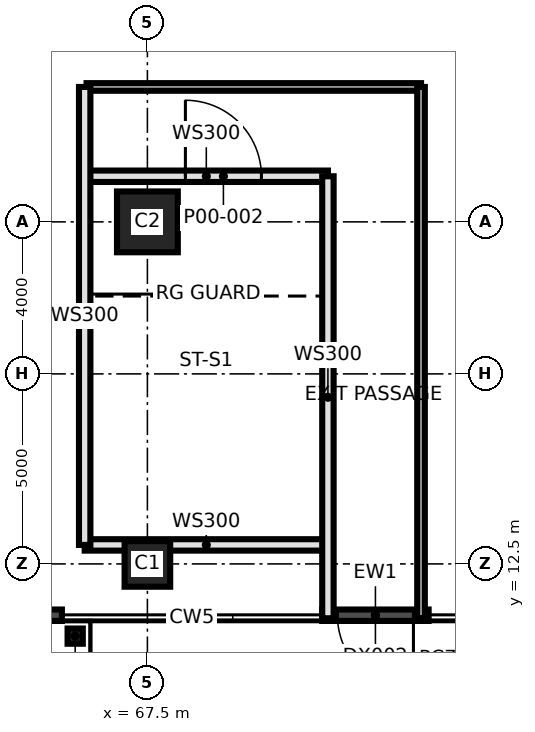
"""IFC4 building model, lengths in metres.
Left out: names, types, materials, properties, quantities, classifications, styles, units other than length and angle.
Written with IfcOpenShell. Run it as: python <this file> out.ifc"""

import sys

from ifc_helpers import new_model, si_unit, direction, frame, frame_2d, origin, origin_2d, place, context, subcontext, project, spatial, rectangle, extrude, element, fill, save


model = new_model("IFC4")
c1 = context("Model", 3, precision=1e-05, world=origin(), true_north=direction((0.0, 1.0)))
c2 = subcontext(c1, "Body", "Model", "MODEL_VIEW")
j1 = project(units=[si_unit("LENGTHUNIT", "METRE"), si_unit("PLANEANGLEUNIT", "RADIAN")], contexts=[c1])
p1 = place(None, origin())
s1 = spatial("IfcSite", under=j1, at=p1, CompositionType="ELEMENT")
p2 = place(p1, origin())
s2 = spatial("IfcBuilding", under=s1, at=p2, CompositionType="ELEMENT")
p3 = place(p2, origin())
s3 = spatial("IfcBuildingStorey", under=s2, at=p3, CompositionType="ELEMENT", Elevation=0.0)
p4 = place(p3, frame((67.5, 12.5, 0.0), z_axis=(0.0, 0.0, 1.0), x_axis=(1.0, 0.0, 0.0)))
e1 = element("IfcColumn", 1, at=p4, inside=s3, PredefinedType="COLUMN", context=c2, shape_type="SweptSolid", body=[
    extrude(rectangle(XDim=1.2, YDim=1.2, at=origin_2d()), origin(), (0.0, 0.0, 1.0), 8.0),
])
p5 = place(p3, frame((67.5, 21.5, 0.0), z_axis=(0.0, 0.0, 1.0), x_axis=(1.0, 0.0, 0.0)))
e2 = element("IfcColumn", 2, at=p5, inside=s3, PredefinedType="COLUMN", context=c2, shape_type="SweptSolid", body=[
    extrude(rectangle(XDim=1.6, YDim=1.6, at=origin_2d()), origin(), (0.0, 0.0, 1.0), 8.0),
])
p6 = place(p3, frame((65.25, 11.15, 0.0), z_axis=(0.0, 0.0, 1.0), x_axis=(-1.0, 0.0, 0.0)))
e3 = element("IfcWall", 3, at=p6, inside=s3, PredefinedType="SOLIDWALL", context=c2, shape_type="SweptSolid", body=[
    extrude(rectangle(XDim=4.5, YDim=0.3, at=frame_2d((2.25, 0.0))), origin(), (0.0, 0.0, 1.0), 7.7),
])
p7 = place(p6, frame((0.45, 0.0, 0.0)))
e4 = element("IfcOpeningElement", 4, at=p7, cuts=e3, PredefinedType="OPENING", context=c2, shape_type="SweptSolid", body=[
    extrude(rectangle(XDim=3.6, YDim=3.0, at=frame_2d((1.8, 1.5))), frame((0.0, 0.16, 0.0), z_axis=(0.0, -1.0, 0.0), x_axis=(1.0, 0.0, 0.0)), (0.0, 0.0, 1.0), 0.32),
])
p8 = place(p3, frame((74.9, 11.15, 0.0), z_axis=(0.0, 0.0, 1.0), x_axis=(-1.0, 0.0, 0.0)))
e5 = element("IfcWall", 5, at=p8, inside=s3, PredefinedType="SOLIDWALL", context=c2, shape_type="SweptSolid", body=[
    extrude(rectangle(XDim=2.8, YDim=0.3, at=frame_2d((1.4, 0.0))), origin(), (0.0, 0.0, 1.0), 7.7),
])
p9 = place(p8, frame((0.4, 0.0, 0.0)))
e6 = element("IfcOpeningElement", 6, at=p9, cuts=e5, PredefinedType="OPENING", context=c2, shape_type="SweptSolid", body=[
    extrude(rectangle(XDim=2.0, YDim=2.4, at=frame_2d((1.0, 1.2))), frame((0.0, 0.16, 0.0), z_axis=(0.0, -1.0, 0.0), x_axis=(1.0, 0.0, 0.0)), (0.0, 0.0, 1.0), 0.32),
])
p10 = place(p3, frame((65.85, 13.0, 0.0), z_axis=(0.0, 0.0, 1.0), x_axis=(1.0, 0.0, 0.0)))
e7 = element("IfcWall", 7, at=p10, inside=s3, PredefinedType="SOLIDWALL", context=c2, shape_type="SweptSolid", body=[
    extrude(rectangle(XDim=6.4, YDim=0.3, at=frame_2d((3.2, 0.0))), origin(), (0.0, 0.0, 1.0), 7.7),
])
p11 = place(p3, frame((65.85, 22.7, 0.0), z_axis=(0.0, 0.0, 1.0), x_axis=(1.0, 0.0, 0.0)))
e8 = element("IfcWall", 8, at=p11, inside=s3, PredefinedType="SOLIDWALL", context=c2, shape_type="SweptSolid", body=[
    extrude(rectangle(XDim=6.4, YDim=0.3, at=frame_2d((3.2, 0.0))), origin(), (0.0, 0.0, 1.0), 7.7),
])
p12 = place(p11, frame((2.65, 0.0, 0.0)))
e9 = element("IfcOpeningElement", 9, at=p12, cuts=e8, PredefinedType="OPENING", context=c2, shape_type="SweptSolid", body=[
    extrude(rectangle(XDim=2.0, YDim=2.1, at=frame_2d((1.0, 1.05))), frame((0.0, 0.16, 0.0), z_axis=(0.0, -1.0, 0.0), x_axis=(1.0, 0.0, 0.0)), (0.0, 0.0, 1.0), 0.32),
])
p13 = place(p3, frame((65.9, 25.05, 0.0), z_axis=(0.0, 0.0, 1.0), x_axis=(1.0, 0.0, 0.0)))
e10 = element("IfcWall", 10, at=p13, inside=s3, PredefinedType="PARTITIONING", context=c2, shape_type="SweptSolid", body=[
    extrude(rectangle(XDim=8.8, YDim=0.2, at=frame_2d((4.4, 0.0))), origin(), (0.0, 0.0, 1.0), 7.7),
])
p14 = place(p3, frame((65.85, 13.0, 0.0), z_axis=(0.0, 0.0, 1.0), x_axis=(0.0, 1.0, 0.0)))
e11 = element("IfcWall", 11, at=p14, inside=s3, PredefinedType="SOLIDWALL", context=c2, shape_type="SweptSolid", body=[
    extrude(rectangle(XDim=12.05, YDim=0.3, at=frame_2d((6.025, 0.0))), origin(), (0.0, 0.0, 1.0), 7.7),
])
p15 = place(p3, frame((72.25, 11.07, 0.0), z_axis=(0.0, 0.0, 1.0), x_axis=(0.0, 1.0, 0.0)))
e12 = element("IfcWall", 12, at=p15, inside=s3, PredefinedType="SOLIDWALL", context=c2, shape_type="SweptSolid", body=[
    extrude(rectangle(XDim=11.63, YDim=0.3, at=frame_2d((5.815, 0.0))), origin(), (0.0, 0.0, 1.0), 6.8),
])
p16 = place(p3, frame((74.7, 11.07, 0.0), z_axis=(0.0, 0.0, 1.0), x_axis=(0.0, 1.0, 0.0)))
e13 = element("IfcWall", 13, at=p16, inside=s3, PredefinedType="PARTITIONING", context=c2, shape_type="SweptSolid", body=[
    extrude(rectangle(XDim=13.98, YDim=0.2, at=frame_2d((6.99, 0.0))), origin(), (0.0, 0.0, 1.0), 6.8),
])
p17 = place(p3, frame((65.6, 10.6, -0.02), z_axis=(0.0, 0.0, 1.0), x_axis=(1.0, 0.0, 0.0)))
e14 = element("IfcColumn", 14, at=p17, inside=s3, PredefinedType="COLUMN", context=c2, shape_type="SweptSolid", body=[
    extrude(rectangle(XDim=0.4, YDim=0.4, at=origin_2d()), origin(), (0.0, 0.0, 1.0), 4.37),
])
p18 = place(p9, origin())
e15 = element("IfcDoor", 15, at=p18, inside=s3, OperationType="SINGLE_SWING_LEFT", PredefinedType="DOOR", context=c2, shape_type="SweptSolid", body=[
    extrude(rectangle(XDim=2.0, YDim=2.4, at=frame_2d((1.0, 1.2))), frame((0.0, 0.025, 0.0), z_axis=(0.0, -1.0, 0.0), x_axis=(1.0, 0.0, 0.0)), (0.0, 0.0, 1.0), 0.05),
])
fill(e6, e15)
p19 = place(p12, origin())
e16 = element("IfcDoor", 16, at=p19, inside=s3, OperationType="SINGLE_SWING_RIGHT", PredefinedType="DOOR", context=c2, shape_type="SweptSolid", body=[
    extrude(rectangle(XDim=2.0, YDim=2.1, at=frame_2d((1.0, 1.05))), frame((0.0, 0.025, 0.0), z_axis=(0.0, -1.0, 0.0), x_axis=(1.0, 0.0, 0.0)), (0.0, 0.0, 1.0), 0.05),
])
fill(e9, e16)
save(model, sys.argv[1])
